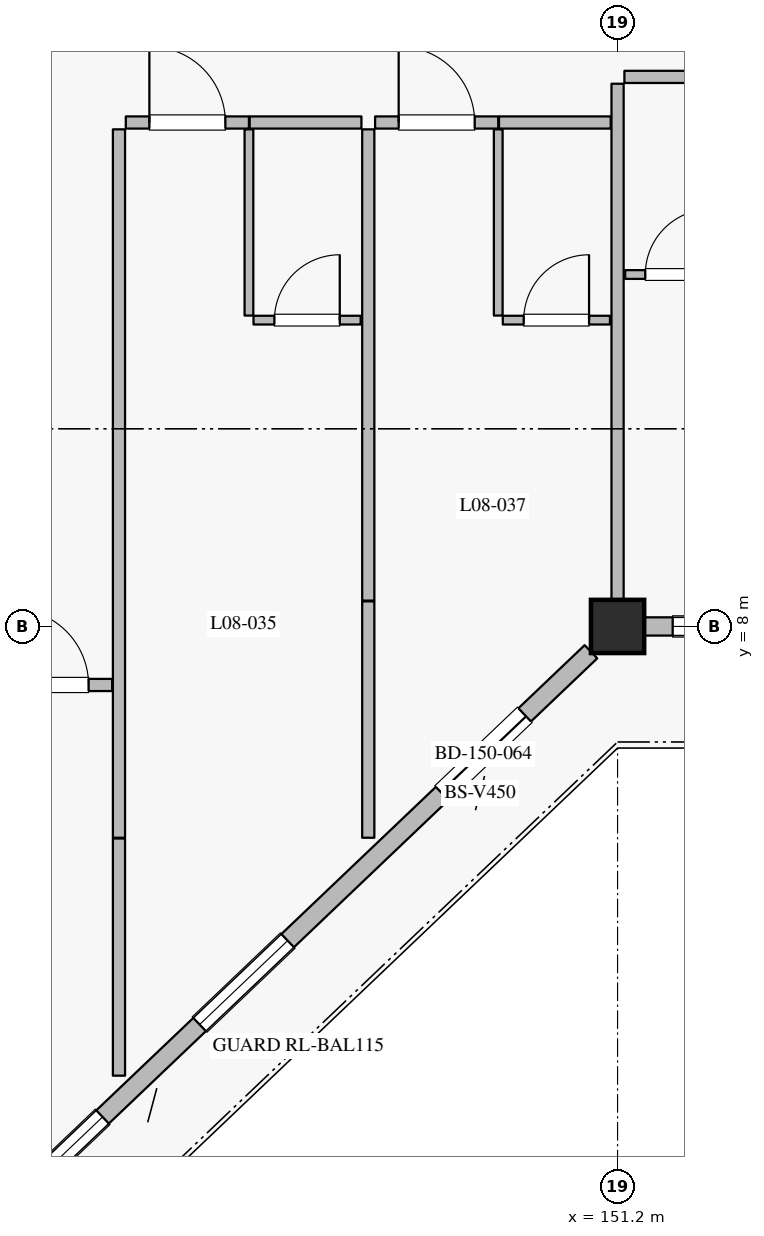
"""IFC4 building model, lengths in metres.
Left out: names, types, materials, properties, quantities, classifications, styles, units other than length and angle.
Written with IfcOpenShell. Run it as: python <this file> out.ifc"""

import sys

from ifc_helpers import new_model, si_unit, direction, frame, frame_2d, origin, origin_2d, place, context, subcontext, project, spatial, rectangle, extrude, element, fill, save


model = new_model("IFC4")
c1 = context("Model", 3, precision=1e-05, world=origin(), true_north=direction((0.0, 1.0)))
c2 = subcontext(c1, "Body", "Model", "MODEL_VIEW")
j1 = project(units=[si_unit("LENGTHUNIT", "METRE"), si_unit("PLANEANGLEUNIT", "RADIAN")], contexts=[c1])
p1 = place(None, origin())
s1 = spatial("IfcSite", under=j1, at=p1, CompositionType="ELEMENT")
p2 = place(p1, origin())
s2 = spatial("IfcBuilding", under=s1, at=p2, CompositionType="ELEMENT")
p3 = place(p2, frame((0.0, 0.0, 36.0)))
s3 = spatial("IfcBuildingStorey", under=s2, at=p3, CompositionType="ELEMENT", Elevation=36.0)
p4 = place(p3, frame((151.2, 8.0, 0.0), z_axis=(0.0, 0.0, 1.0), x_axis=(1.0, 0.0, 0.0)))
e1 = element("IfcColumn", 1, at=p4, inside=s3, PredefinedType="COLUMN", context=c2, shape_type="SweptSolid", body=[
    extrude(rectangle(XDim=0.7, YDim=0.7, at=origin_2d()), origin(), (0.0, 0.0, 1.0), 3.6),
])
p5 = place(p3, frame((150.85, 7.667, 0.0), z_axis=(0.0, 0.0, 1.0), x_axis=(-0.724116091282, -0.689678103427, 0.0)))
e2 = element("IfcWall", 2, at=p5, inside=s3, PredefinedType="SOLIDWALL", context=c2, shape_type="SweptSolid", body=[
    extrude(rectangle(XDim=10.634, YDim=0.24, at=frame_2d((5.317, 0.0))), origin(), (0.0, 0.0, 1.0), 2.94),
])
p6 = place(p5, frame((1.204, 0.0, 0.0)))
e3 = element("IfcOpeningElement", 3, at=p6, cuts=e2, PredefinedType="OPENING", context=c2, shape_type="SweptSolid", body=[
    extrude(rectangle(XDim=1.5, YDim=2.25, at=frame_2d((0.75, 1.125))), frame((0.0, 0.13, 0.0), z_axis=(0.0, -1.0, 0.0), x_axis=(1.0, 0.0, 0.0)), (0.0, 0.0, 1.0), 0.26),
])
p7 = place(p5, frame((5.511, 0.0, 0.8)))
e4 = element("IfcOpeningElement", 4, at=p7, cuts=e2, PredefinedType="OPENING", context=c2, shape_type="SweptSolid", body=[
    extrude(rectangle(XDim=1.6, YDim=1.6, at=frame_2d((0.8, 0.8))), frame((0.0, 0.13, 0.0), z_axis=(0.0, -1.0, 0.0), x_axis=(1.0, 0.0, 0.0)), (0.0, 0.0, 1.0), 0.26),
])
p8 = place(p5, frame((8.874, 0.0, 0.8)))
e5 = element("IfcOpeningElement", 5, at=p8, cuts=e2, PredefinedType="OPENING", context=c2, shape_type="SweptSolid", body=[
    extrude(rectangle(XDim=1.6, YDim=1.6, at=frame_2d((0.8, 0.8))), frame((0.0, 0.13, 0.0), z_axis=(0.0, -1.0, 0.0), x_axis=(1.0, 0.0, 0.0)), (0.0, 0.0, 1.0), 0.26),
])
p9 = place(p3, frame((159.25, 8.0, 0.0), z_axis=(0.0, 0.0, 1.0), x_axis=(-1.0, 0.0, 0.0)))
e6 = element("IfcWall", 6, at=p9, inside=s3, PredefinedType="SOLIDWALL", context=c2, shape_type="SweptSolid", body=[
    extrude(rectangle(XDim=7.7, YDim=0.24, at=frame_2d((3.85, 0.0))), origin(), (0.0, 0.0, 1.0), 2.94),
])
p10 = place(p9, frame((0.175, 0.0, 0.8)))
e7 = element("IfcOpeningElement", 7, at=p10, cuts=e6, PredefinedType="OPENING", context=c2, shape_type="SweptSolid", body=[
    extrude(rectangle(XDim=1.2, YDim=1.5, at=frame_2d((0.6, 0.75))), frame((0.0, 0.13, 0.0), z_axis=(0.0, -1.0, 0.0), x_axis=(1.0, 0.0, 0.0)), (0.0, 0.0, 1.0), 0.26),
])
p11 = place(p9, frame((2.25, 0.0, 0.8)))
e8 = element("IfcOpeningElement", 8, at=p11, cuts=e6, PredefinedType="OPENING", context=c2, shape_type="SweptSolid", body=[
    extrude(rectangle(XDim=2.0, YDim=1.75, at=frame_2d((1.0, 0.875))), frame((0.0, 0.13, 0.0), z_axis=(0.0, -1.0, 0.0), x_axis=(1.0, 0.0, 0.0)), (0.0, 0.0, 1.0), 0.26),
])
p12 = place(p9, frame((5.325, 0.0, 0.8)))
e9 = element("IfcOpeningElement", 9, at=p12, cuts=e6, PredefinedType="OPENING", context=c2, shape_type="SweptSolid", body=[
    extrude(rectangle(XDim=2.0, YDim=1.75, at=frame_2d((1.0, 0.875))), frame((0.0, 0.13, 0.0), z_axis=(0.0, -1.0, 0.0), x_axis=(1.0, 0.0, 0.0)), (0.0, 0.0, 1.0), 0.26),
])
p13 = place(p3, frame((142.93, 7.23, 0.0), z_axis=(0.0, 0.0, 1.0), x_axis=(1.0, 0.0, 0.0)))
e10 = element("IfcWall", 10, at=p13, inside=s3, PredefinedType="PARTITIONING", context=c2, shape_type="SweptSolid", body=[
    extrude(rectangle(XDim=1.62, YDim=0.16, at=frame_2d((0.81, 0.0))), origin(), (0.0, 0.0, 1.0), 3.365),
])
p14 = place(p13, frame((0.31, 0.0, 0.0)))
e11 = element("IfcOpeningElement", 11, at=p14, cuts=e10, PredefinedType="OPENING", context=c2, shape_type="SweptSolid", body=[
    extrude(rectangle(XDim=1.0, YDim=2.25, at=frame_2d((0.5, 1.125))), frame((0.0, 0.09, 0.0), z_axis=(0.0, -1.0, 0.0), x_axis=(1.0, 0.0, 0.0)), (0.0, 0.0, 1.0), 0.18),
])
p15 = place(p3, frame((144.64, 2.09, 0.0), z_axis=(0.0, 0.0, 1.0), x_axis=(0.0, 1.0, 0.0)))
e12 = element("IfcWall", 12, at=p15, inside=s3, PredefinedType="PARTITIONING", context=c2, shape_type="SweptSolid", body=[
    extrude(rectangle(XDim=3.12, YDim=0.16, at=frame_2d((1.56, 0.0))), origin(), (0.0, 0.0, 1.0), 3.365),
])
p16 = place(p3, frame((144.73, 14.63, 0.0), z_axis=(0.0, 0.0, 1.0), x_axis=(1.0, 0.0, 0.0)))
e13 = element("IfcWall", 13, at=p16, inside=s3, PredefinedType="PARTITIONING", context=c2, shape_type="SweptSolid", body=[
    extrude(rectangle(XDim=1.62, YDim=0.16, at=frame_2d((0.81, 0.0))), origin(), (0.0, 0.0, 1.0), 3.365),
])
p17 = place(p16, frame((0.31, 0.0, 0.0)))
e14 = element("IfcOpeningElement", 14, at=p17, cuts=e13, PredefinedType="OPENING", context=c2, shape_type="SweptSolid", body=[
    extrude(rectangle(XDim=1.0, YDim=2.25, at=frame_2d((0.5, 1.125))), frame((0.0, 0.09, 0.0), z_axis=(0.0, -1.0, 0.0), x_axis=(1.0, 0.0, 0.0)), (0.0, 0.0, 1.0), 0.18),
])
p18 = place(p3, frame((146.36, 14.63, 0.0), z_axis=(0.0, 0.0, 1.0), x_axis=(1.0, 0.0, 0.0)))
e15 = element("IfcWall", 15, at=p18, inside=s3, PredefinedType="PARTITIONING", context=c2, shape_type="SweptSolid", body=[
    extrude(rectangle(XDim=1.47, YDim=0.16, at=frame_2d((0.735, 0.0))), origin(), (0.0, 0.0, 1.0), 3.365),
])
p19 = place(p3, frame((146.35, 12.09, 0.0), z_axis=(0.0, 0.0, 1.0), x_axis=(0.0, 1.0, 0.0)))
e16 = element("IfcWall", 16, at=p19, inside=s3, PredefinedType="PARTITIONING", context=c2, shape_type="SweptSolid", body=[
    extrude(rectangle(XDim=2.45, YDim=0.115, at=frame_2d((1.225, 0.0))), origin(), (0.0, 0.0, 1.0), 3.365),
])
p20 = place(p3, frame((146.41, 12.03, 0.0), z_axis=(0.0, 0.0, 1.0), x_axis=(1.0, 0.0, 0.0)))
e17 = element("IfcWall", 17, at=p20, inside=s3, PredefinedType="PARTITIONING", context=c2, shape_type="SweptSolid", body=[
    extrude(rectangle(XDim=1.41, YDim=0.115, at=frame_2d((0.705, 0.0))), origin(), (0.0, 0.0, 1.0), 3.365),
])
p21 = place(p20, frame((0.275, 0.0, 0.0)))
e18 = element("IfcOpeningElement", 18, at=p21, cuts=e17, PredefinedType="OPENING", context=c2, shape_type="SweptSolid", body=[
    extrude(rectangle(XDim=0.86, YDim=2.12, at=frame_2d((0.43, 1.06))), frame((0.0, 0.067, 0.0), z_axis=(0.0, -1.0, 0.0), x_axis=(1.0, 0.0, 0.0)), (0.0, 0.0, 1.0), 0.135),
])
p22 = place(p3, frame((144.64, 5.22, 0.0), z_axis=(0.0, 0.0, 1.0), x_axis=(0.0, 1.0, 0.0)))
e19 = element("IfcWall", 19, at=p22, inside=s3, PredefinedType="PARTITIONING", context=c2, shape_type="SweptSolid", body=[
    extrude(rectangle(XDim=9.32, YDim=0.16, at=frame_2d((4.66, 0.0))), origin(), (0.0, 0.0, 1.0), 3.365),
])
p23 = place(p3, frame((147.92, 5.22, 0.0), z_axis=(0.0, 0.0, 1.0), x_axis=(0.0, 1.0, 0.0)))
e20 = element("IfcWall", 20, at=p23, inside=s3, PredefinedType="PARTITIONING", context=c2, shape_type="SweptSolid", body=[
    extrude(rectangle(XDim=3.11, YDim=0.16, at=frame_2d((1.555, 0.0))), origin(), (0.0, 0.0, 1.0), 3.365),
])
p24 = place(p3, frame((148.01, 14.63, 0.0), z_axis=(0.0, 0.0, 1.0), x_axis=(1.0, 0.0, 0.0)))
e21 = element("IfcWall", 21, at=p24, inside=s3, PredefinedType="PARTITIONING", context=c2, shape_type="SweptSolid", body=[
    extrude(rectangle(XDim=1.62, YDim=0.16, at=frame_2d((0.81, 0.0))), origin(), (0.0, 0.0, 1.0), 3.365),
])
p25 = place(p24, frame((0.31, 0.0, 0.0)))
e22 = element("IfcOpeningElement", 22, at=p25, cuts=e21, PredefinedType="OPENING", context=c2, shape_type="SweptSolid", body=[
    extrude(rectangle(XDim=1.0, YDim=2.25, at=frame_2d((0.5, 1.125))), frame((0.0, 0.09, 0.0), z_axis=(0.0, -1.0, 0.0), x_axis=(1.0, 0.0, 0.0)), (0.0, 0.0, 1.0), 0.18),
])
p26 = place(p3, frame((149.64, 14.63, 0.0), z_axis=(0.0, 0.0, 1.0), x_axis=(1.0, 0.0, 0.0)))
e23 = element("IfcWall", 23, at=p26, inside=s3, PredefinedType="PARTITIONING", context=c2, shape_type="SweptSolid", body=[
    extrude(rectangle(XDim=1.47, YDim=0.16, at=frame_2d((0.735, 0.0))), origin(), (0.0, 0.0, 1.0), 3.365),
])
p27 = place(p3, frame((149.63, 12.09, 0.0), z_axis=(0.0, 0.0, 1.0), x_axis=(0.0, 1.0, 0.0)))
e24 = element("IfcWall", 24, at=p27, inside=s3, PredefinedType="PARTITIONING", context=c2, shape_type="SweptSolid", body=[
    extrude(rectangle(XDim=2.45, YDim=0.115, at=frame_2d((1.225, 0.0))), origin(), (0.0, 0.0, 1.0), 3.365),
])
p28 = place(p3, frame((149.69, 12.03, 0.0), z_axis=(0.0, 0.0, 1.0), x_axis=(1.0, 0.0, 0.0)))
e25 = element("IfcWall", 25, at=p28, inside=s3, PredefinedType="PARTITIONING", context=c2, shape_type="SweptSolid", body=[
    extrude(rectangle(XDim=1.41, YDim=0.115, at=frame_2d((0.705, 0.0))), origin(), (0.0, 0.0, 1.0), 3.365),
])
p29 = place(p28, frame((0.275, 0.0, 0.0)))
e26 = element("IfcOpeningElement", 26, at=p29, cuts=e25, PredefinedType="OPENING", context=c2, shape_type="SweptSolid", body=[
    extrude(rectangle(XDim=0.86, YDim=2.12, at=frame_2d((0.43, 1.06))), frame((0.0, 0.067, 0.0), z_axis=(0.0, -1.0, 0.0), x_axis=(1.0, 0.0, 0.0)), (0.0, 0.0, 1.0), 0.135),
])
p30 = place(p3, frame((147.92, 8.34, 0.0), z_axis=(0.0, 0.0, 1.0), x_axis=(0.0, 1.0, 0.0)))
e27 = element("IfcWall", 27, at=p30, inside=s3, PredefinedType="PARTITIONING", context=c2, shape_type="SweptSolid", body=[
    extrude(rectangle(XDim=6.2, YDim=0.16, at=frame_2d((3.1, 0.0))), origin(), (0.0, 0.0, 1.0), 3.365),
])
p31 = place(p3, frame((151.29, 15.23, 0.0), z_axis=(0.0, 0.0, 1.0), x_axis=(1.0, 0.0, 0.0)))
e28 = element("IfcWall", 28, at=p31, inside=s3, PredefinedType="PARTITIONING", context=c2, shape_type="SweptSolid", body=[
    extrude(rectangle(XDim=1.45, YDim=0.16, at=frame_2d((0.725, 0.0))), origin(), (0.0, 0.0, 1.0), 3.365),
])
p32 = place(p3, frame((151.3, 12.63, 0.0), z_axis=(0.0, 0.0, 1.0), x_axis=(1.0, 0.0, 0.0)))
e29 = element("IfcWall", 29, at=p32, inside=s3, PredefinedType="PARTITIONING", context=c2, shape_type="SweptSolid", body=[
    extrude(rectangle(XDim=1.39, YDim=0.115, at=frame_2d((0.695, 0.0))), origin(), (0.0, 0.0, 1.0), 3.365),
])
p33 = place(p32, frame((0.265, 0.0, 0.0)))
e30 = element("IfcOpeningElement", 30, at=p33, cuts=e29, PredefinedType="OPENING", context=c2, shape_type="SweptSolid", body=[
    extrude(rectangle(XDim=0.86, YDim=2.12, at=frame_2d((0.43, 1.06))), frame((0.0, 0.067, 0.0), z_axis=(0.0, -1.0, 0.0), x_axis=(1.0, 0.0, 0.0)), (0.0, 0.0, 1.0), 0.135),
])
p34 = place(p3, frame((151.2, 8.34, 0.0), z_axis=(0.0, 0.0, 1.0), x_axis=(0.0, 1.0, 0.0)))
e31 = element("IfcWall", 31, at=p34, inside=s3, PredefinedType="PARTITIONING", context=c2, shape_type="SweptSolid", body=[
    extrude(rectangle(XDim=6.8, YDim=0.16, at=frame_2d((3.4, 0.0))), origin(), (0.0, 0.0, 1.0), 2.74),
])
p35 = place(p6, origin())
e32 = element("IfcDoor", 32, at=p35, inside=s3, OperationType="SLIDING_TO_LEFT", PredefinedType="DOOR", context=c2, shape_type="SweptSolid", body=[
    extrude(rectangle(XDim=1.5, YDim=2.25, at=frame_2d((0.75, 1.125))), frame((0.0, 0.025, 0.0), z_axis=(0.0, -1.0, 0.0), x_axis=(1.0, 0.0, 0.0)), (0.0, 0.0, 1.0), 0.05),
])
fill(e3, e32)
p36 = place(p7, origin())
e33 = element("IfcWindow", 33, at=p36, inside=s3, PartitioningType="SINGLE_PANEL", PredefinedType="WINDOW", context=c2, shape_type="SweptSolid", body=[
    extrude(rectangle(XDim=1.6, YDim=1.6, at=frame_2d((0.8, 0.8))), frame((0.0, 0.03, 0.0), z_axis=(0.0, -1.0, 0.0), x_axis=(1.0, 0.0, 0.0)), (0.0, 0.0, 1.0), 0.06),
])
fill(e4, e33)
p37 = place(p8, origin())
e34 = element("IfcWindow", 34, at=p37, inside=s3, PartitioningType="SINGLE_PANEL", PredefinedType="WINDOW", context=c2, shape_type="SweptSolid", body=[
    extrude(rectangle(XDim=1.6, YDim=1.6, at=frame_2d((0.8, 0.8))), frame((0.0, 0.03, 0.0), z_axis=(0.0, -1.0, 0.0), x_axis=(1.0, 0.0, 0.0)), (0.0, 0.0, 1.0), 0.06),
])
fill(e5, e34)
p38 = place(p12, origin())
e35 = element("IfcWindow", 35, at=p38, inside=s3, PartitioningType="DOUBLE_PANEL_VERTICAL", PredefinedType="WINDOW", context=c2, shape_type="SweptSolid", body=[
    extrude(rectangle(XDim=2.0, YDim=1.75, at=frame_2d((1.0, 0.875))), frame((0.0, 0.03, 0.0), z_axis=(0.0, -1.0, 0.0), x_axis=(1.0, 0.0, 0.0)), (0.0, 0.0, 1.0), 0.06),
])
fill(e9, e35)
p39 = place(p14, origin())
e36 = element("IfcDoor", 36, at=p39, inside=s3, OperationType="SINGLE_SWING_LEFT", PredefinedType="DOOR", context=c2, shape_type="SweptSolid", body=[
    extrude(rectangle(XDim=1.0, YDim=2.25, at=frame_2d((0.5, 1.125))), frame((0.0, 0.025, 0.0), z_axis=(0.0, -1.0, 0.0), x_axis=(1.0, 0.0, 0.0)), (0.0, 0.0, 1.0), 0.05),
])
fill(e11, e36)
p40 = place(p17, origin())
e37 = element("IfcDoor", 37, at=p40, inside=s3, OperationType="SINGLE_SWING_LEFT", PredefinedType="DOOR", context=c2, shape_type="SweptSolid", body=[
    extrude(rectangle(XDim=1.0, YDim=2.25, at=frame_2d((0.5, 1.125))), frame((0.0, 0.025, 0.0), z_axis=(0.0, -1.0, 0.0), x_axis=(1.0, 0.0, 0.0)), (0.0, 0.0, 1.0), 0.05),
])
fill(e14, e37)
p41 = place(p21, origin())
e38 = element("IfcDoor", 38, at=p41, inside=s3, OperationType="SINGLE_SWING_RIGHT", PredefinedType="DOOR", context=c2, shape_type="SweptSolid", body=[
    extrude(rectangle(XDim=0.86, YDim=2.12, at=frame_2d((0.43, 1.06))), frame((0.0, 0.025, 0.0), z_axis=(0.0, -1.0, 0.0), x_axis=(1.0, 0.0, 0.0)), (0.0, 0.0, 1.0), 0.05),
])
fill(e18, e38)
p42 = place(p25, origin())
e39 = element("IfcDoor", 39, at=p42, inside=s3, OperationType="SINGLE_SWING_LEFT", PredefinedType="DOOR", context=c2, shape_type="SweptSolid", body=[
    extrude(rectangle(XDim=1.0, YDim=2.25, at=frame_2d((0.5, 1.125))), frame((0.0, 0.025, 0.0), z_axis=(0.0, -1.0, 0.0), x_axis=(1.0, 0.0, 0.0)), (0.0, 0.0, 1.0), 0.05),
])
fill(e22, e39)
p43 = place(p29, origin())
e40 = element("IfcDoor", 40, at=p43, inside=s3, OperationType="SINGLE_SWING_RIGHT", PredefinedType="DOOR", context=c2, shape_type="SweptSolid", body=[
    extrude(rectangle(XDim=0.86, YDim=2.12, at=frame_2d((0.43, 1.06))), frame((0.0, 0.025, 0.0), z_axis=(0.0, -1.0, 0.0), x_axis=(1.0, 0.0, 0.0)), (0.0, 0.0, 1.0), 0.05),
])
fill(e26, e40)
p44 = place(p33, origin())
e41 = element("IfcDoor", 41, at=p44, inside=s3, OperationType="SINGLE_SWING_RIGHT", PredefinedType="DOOR", context=c2, shape_type="SweptSolid", body=[
    extrude(rectangle(XDim=0.86, YDim=2.12, at=frame_2d((0.43, 1.06))), frame((0.0, 0.025, 0.0), z_axis=(0.0, -1.0, 0.0), x_axis=(1.0, 0.0, 0.0)), (0.0, 0.0, 1.0), 0.05),
])
fill(e30, e41)
save(model, sys.argv[1])
